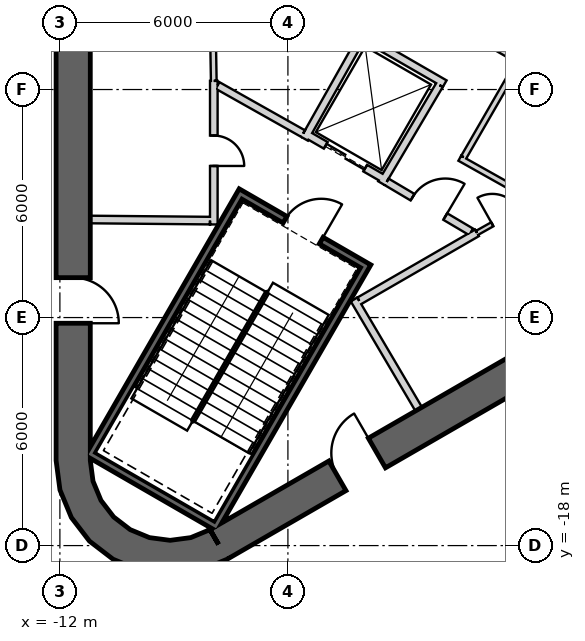
"""IFC4 building model, lengths in metres.
Left out: names, types, materials, properties, quantities, classifications, styles, units other than length and angle.
Written with IfcOpenShell. Run it as: python <this file> out.ifc"""

import sys

from ifc_helpers import new_model, si_unit, direction, frame, frame_2d, origin, place, context, subcontext, project, spatial, polyline, rectangle, outline, extrude, element, fill, save


model = new_model("IFC4")
c1 = context("Model", 3, precision=1e-05, world=origin(), true_north=direction((0.0, 1.0)))
c2 = subcontext(c1, "Body", "Model", "MODEL_VIEW")
j1 = project(units=[si_unit("LENGTHUNIT", "METRE"), si_unit("PLANEANGLEUNIT", "RADIAN")], contexts=[c1])
p1 = place(None, origin())
s1 = spatial("IfcSite", under=j1, at=p1, CompositionType="ELEMENT")
p2 = place(p1, origin())
s2 = spatial("IfcBuilding", under=s1, at=p2, CompositionType="ELEMENT")
p3 = place(p2, frame((0.0, 0.0, 410.3)))
s3 = spatial("IfcBuildingStorey", under=s2, at=p3, CompositionType="ELEMENT", Elevation=410.3)
p4 = place(p3, frame((-11.65, 15.762, 0.0), z_axis=(0.0, 0.0, 1.0), x_axis=(0.0, -1.0, 0.0)))
e1 = element("IfcWall", 1, at=p4, inside=s3, PredefinedType="SHEAR", context=c2, shape_type="SweptSolid", body=[
    extrude(rectangle(XDim=31.523, YDim=0.9, at=frame_2d((15.762, 0.0))), origin(), (0.0, 0.0, 1.0), 5.0),
])
p5 = place(p4, frame((3.612, 0.0, 0.0)))
e2 = element("IfcOpeningElement", 2, at=p5, cuts=e1, PredefinedType="OPENING", context=c2, shape_type="SweptSolid", body=[
    extrude(rectangle(XDim=1.2, YDim=2.4, at=frame_2d((0.6, 1.2))), frame((0.0, 0.46, 0.0), z_axis=(0.0, -1.0, 0.0), x_axis=(1.0, 0.0, 0.0)), (0.0, 0.0, 1.0), 0.92),
])
p6 = place(p4, frame((26.712, 0.0, 0.0)))
e3 = element("IfcOpeningElement", 3, at=p6, cuts=e1, PredefinedType="OPENING", context=c2, shape_type="SweptSolid", body=[
    extrude(rectangle(XDim=1.2, YDim=2.4, at=frame_2d((0.6, 1.2))), frame((0.0, 0.46, 0.0), z_axis=(0.0, -1.0, 0.0), x_axis=(1.0, 0.0, 0.0)), (0.0, 0.0, 1.0), 0.92),
])
p7 = place(p3, frame((-7.825, -17.97, 0.0), z_axis=(0.0, 0.0, 1.0), x_axis=(0.866028369851, 0.499994862586, 0.0)))
e4 = element("IfcWall", 4, at=p7, inside=s3, PredefinedType="SHEAR", context=c2, shape_type="SweptSolid", body=[
    extrude(rectangle(XDim=31.523, YDim=0.9, at=frame_2d((15.762, 0.0))), origin(), (0.0, 0.0, 1.0), 5.0),
])
p8 = place(p7, frame((17.862, 0.0, 0.0)))
e5 = element("IfcOpeningElement", 5, at=p8, cuts=e4, PredefinedType="OPENING", context=c2, shape_type="SweptSolid", body=[
    extrude(rectangle(XDim=1.2, YDim=2.4, at=frame_2d((0.6, 1.2))), frame((0.0, 0.46, 0.0), z_axis=(0.0, -1.0, 0.0), x_axis=(1.0, 0.0, 0.0)), (0.0, 0.0, 1.0), 0.92),
])
p9 = place(p7, frame((20.562, 0.0, 0.0)))
e6 = element("IfcOpeningElement", 6, at=p9, cuts=e4, PredefinedType="OPENING", context=c2, shape_type="SweptSolid", body=[
    extrude(rectangle(XDim=1.2, YDim=2.4, at=frame_2d((0.6, 1.2))), frame((0.0, 0.46, 0.0), z_axis=(0.0, -1.0, 0.0), x_axis=(1.0, 0.0, 0.0)), (0.0, 0.0, 1.0), 0.92),
])
p10 = place(p7, frame((26.712, 0.0, 0.0)))
e7 = element("IfcOpeningElement", 7, at=p10, cuts=e4, PredefinedType="OPENING", context=c2, shape_type="SweptSolid", body=[
    extrude(rectangle(XDim=1.2, YDim=2.4, at=frame_2d((0.6, 1.2))), frame((0.0, 0.46, 0.0), z_axis=(0.0, -1.0, 0.0), x_axis=(1.0, 0.0, 0.0)), (0.0, 0.0, 1.0), 0.92),
])
p11 = place(p7, frame((3.612, 0.0, 0.0)))
e8 = element("IfcOpeningElement", 8, at=p11, cuts=e4, PredefinedType="OPENING", context=c2, shape_type="SweptSolid", body=[
    extrude(rectangle(XDim=1.2, YDim=2.4, at=frame_2d((0.6, 1.2))), frame((0.0, 0.46, 0.0), z_axis=(0.0, -1.0, 0.0), x_axis=(1.0, 0.0, 0.0)), (0.0, 0.0, 1.0), 0.92),
])
p12 = place(p3, origin())
e9 = element("IfcWall", 9, at=p12, inside=s3, PredefinedType="SHEAR", context=c2, shape_type="SweptSolid", body=[
    extrude(outline(polyline([(-12.1, -15.762), (-11.998, -16.538), (-11.698, -17.262), (-11.221, -17.883), (-10.6, -18.36), (-9.876, -18.659), (-9.1, -18.762), (-8.323, -18.659), (-7.6, -18.36), (-8.05, -17.58), (-8.556, -17.79), (-9.1, -17.862), (-9.644, -17.79), (-10.15, -17.58), (-10.585, -17.247), (-10.919, -16.812), (-11.128, -16.305), (-11.2, -15.762), (-12.1, -15.762)])), origin(), (0.0, 0.0, 1.0), 5.0),
])
p13 = place(p3, frame((-1.186, -23.926, 0.0), z_axis=(0.0, 0.0, 1.0), x_axis=(0.824480875731, 0.565889817503, 0.0)))
e10 = element("IfcWall", 10, at=p13, inside=s3, PredefinedType="SOLIDWALL", context=c2, shape_type="SweptSolid", body=[
    extrude(rectangle(XDim=26.064, YDim=0.24, at=frame_2d((13.032, 0.0))), origin(), (0.0, 0.0, 1.0), 4.75),
])
p14 = place(p3, frame((21.34, -9.818, 0.04), z_axis=(0.0, 0.0, 1.0), x_axis=(-0.82447788812, -0.565894170319, 0.0)))
e11 = element("IfcWall", 11, at=p14, inside=s3, PredefinedType="PARAPET", context=c2, shape_type="SweptSolid", body=[
    extrude(rectangle(XDim=27.207, YDim=0.25, at=frame_2d((13.603, 0.0))), origin(), (0.0, 0.0, 1.0), 1.2),
])
p15 = place(p3, frame((20.588, -9.667, 0.04), z_axis=(0.0, 0.0, 1.0), x_axis=(-0.824474055668, -0.565899753958, 0.0)))
e12 = element("IfcWall", 12, at=p15, inside=s3, PredefinedType="PARAPET", context=c2, shape_type="SweptSolid", body=[
    extrude(rectangle(XDim=26.031, YDim=0.5, at=frame_2d((13.016, 0.0))), origin(), (0.0, 0.0, 1.0), 0.6),
])
p16 = place(p3, frame((-3.905, -10.563, -0.25), z_axis=(0.0, 0.0, 1.0), x_axis=(-0.500012932018, -0.866017937352, 0.0)))
e13 = element("IfcWall", 13, at=p16, inside=s3, PredefinedType="SHEAR", context=c2, shape_type="SweptSolid", body=[
    extrude(rectangle(XDim=8.1, YDim=0.2, at=frame_2d((4.05, 0.0))), origin(), (0.0, 0.0, 1.0), 5.0),
])
p17 = place(p3, frame((-11.282, -15.541, -0.25), z_axis=(0.0, 0.0, 1.0), x_axis=(0.866000483506, -0.500043160704, 0.0)))
e14 = element("IfcWall", 14, at=p17, inside=s3, PredefinedType="SHEAR", context=c2, shape_type="SweptSolid", body=[
    extrude(rectangle(XDim=3.8, YDim=0.2, at=frame_2d((1.9, 0.0))), origin(), (0.0, 0.0, 1.0), 5.0),
])
p18 = place(p3, frame((-7.196, -8.663, -0.25), z_axis=(0.0, 0.0, 1.0), x_axis=(-0.499997992926, -0.866026562566, 0.0)))
e15 = element("IfcWall", 15, at=p18, inside=s3, PredefinedType="SHEAR", context=c2, shape_type="SweptSolid", body=[
    extrude(rectangle(XDim=7.9, YDim=0.2, at=frame_2d((3.95, 0.0))), origin(), (0.0, 0.0, 1.0), 5.0),
])
p19 = place(p3, frame((-4.041, -10.599, -0.25), z_axis=(0.0, 0.0, 1.0), x_axis=(-0.866047807691, 0.499961193289, 0.0)))
e16 = element("IfcWall", 16, at=p19, inside=s3, PredefinedType="SHEAR", context=c2, shape_type="SweptSolid", body=[
    extrude(rectangle(XDim=3.6, YDim=0.2, at=frame_2d((1.8, 0.0))), origin(), (0.0, 0.0, 1.0), 5.0),
])
p20 = place(p19, frame((1.25, 0.0, 0.25)))
e17 = element("IfcOpeningElement", 17, at=p20, cuts=e16, PredefinedType="OPENING", context=c2, shape_type="SweptSolid", body=[
    extrude(rectangle(XDim=1.1, YDim=2.1, at=frame_2d((0.55, 1.05))), frame((0.0, 0.11, 0.0), z_axis=(0.0, -1.0, 0.0), x_axis=(1.0, 0.0, 0.0)), (0.0, 0.0, 1.0), 0.22),
])
p21 = place(p3, frame((-3.446, -8.368, 0.0), z_axis=(0.0, 0.0, 1.0), x_axis=(-0.866024647952, 0.500001309137, 0.0)))
e18 = element("IfcWall", 18, at=p21, inside=s3, PredefinedType="PLUMBINGWALL", context=c2, shape_type="SweptSolid", body=[
    extrude(rectangle(XDim=2.4, YDim=0.2, at=frame_2d((1.2, 0.0))), origin(), (0.0, 0.0, 1.0), 4.75),
])
p22 = place(p21, frame((0.6, 0.0, 0.0)))
e19 = element("IfcOpeningElement", 19, at=p22, cuts=e18, PredefinedType="OPENING", context=c2, shape_type="SweptSolid", body=[
    extrude(rectangle(XDim=1.2, YDim=2.4, at=frame_2d((0.6, 1.2))), frame((0.0, 0.11, 0.0), z_axis=(0.0, -1.0, 0.0), x_axis=(1.0, 0.0, 0.0)), (0.0, 0.0, 1.0), 0.22),
])
p23 = place(p3, frame((-5.562, -7.296, 0.0), z_axis=(0.0, 0.0, 1.0), x_axis=(0.491358283181, 0.870957540612, 0.0)))
e20 = element("IfcWall", 20, at=p23, inside=s3, PredefinedType="PLUMBINGWALL", context=c2, shape_type="SweptSolid", body=[
    extrude(rectangle(XDim=3.2, YDim=0.2, at=frame_2d((1.6, 0.0))), origin(), (0.0, 0.0, 1.0), 4.75),
])
p24 = place(p3, frame((-3.953, -4.646, 0.0), z_axis=(0.0, 0.0, 1.0), x_axis=(0.866024647952, -0.500001309137, 0.0)))
e21 = element("IfcWall", 21, at=p24, inside=s3, PredefinedType="PLUMBINGWALL", context=c2, shape_type="SweptSolid", body=[
    extrude(rectangle(XDim=2.4, YDim=0.2, at=frame_2d((1.2, 0.0))), origin(), (0.0, 0.0, 1.0), 4.75),
])
p25 = place(p3, frame((-2.012, -5.882, 0.0), z_axis=(0.0, 0.0, 1.0), x_axis=(-0.508619639323, -0.860991325447, 0.0)))
e22 = element("IfcWall", 22, at=p25, inside=s3, PredefinedType="PLUMBINGWALL", context=c2, shape_type="SweptSolid", body=[
    extrude(rectangle(XDim=3.0, YDim=0.2, at=frame_2d((1.5, 0.0))), origin(), (0.0, 0.0, 1.0), 4.75),
])
p26 = place(p3, frame((-7.95, -9.55, 0.0), z_axis=(0.0, 0.0, 1.0), x_axis=(0.0, 1.0, 0.0)))
e23 = element("IfcWall", 23, at=p26, inside=s3, PredefinedType="PARTITIONING", context=c2, shape_type="SweptSolid", body=[
    extrude(rectangle(XDim=3.778, YDim=0.2, at=frame_2d((1.889, 0.0))), origin(), (0.0, 0.0, 1.0), 4.75),
])
p27 = place(p26, frame((1.539, 0.0, 0.0)))
e24 = element("IfcOpeningElement", 24, at=p27, cuts=e23, PredefinedType="OPENING", context=c2, shape_type="SweptSolid", body=[
    extrude(rectangle(XDim=0.8, YDim=2.1, at=frame_2d((0.4, 1.05))), frame((0.0, 0.11, 0.0), z_axis=(0.0, -1.0, 0.0), x_axis=(1.0, 0.0, 0.0)), (0.0, 0.0, 1.0), 0.22),
])
p28 = place(p3, frame((-11.2, -9.42, 0.0), z_axis=(0.0, 0.0, 1.0), x_axis=(0.999957467379, -0.009222983926, 0.0)))
e25 = element("IfcWall", 25, at=p28, inside=s3, PredefinedType="PARTITIONING", context=c2, shape_type="SweptSolid", body=[
    extrude(rectangle(XDim=3.15, YDim=0.2, at=frame_2d((1.575, 0.0))), origin(), (0.0, 0.0, 1.0), 4.75),
])
p29 = place(p3, frame((-7.98, -4.05, 0.0), z_axis=(0.0, 0.0, 1.0), x_axis=(0.016723387416, -0.999860154378, 0.0)))
e26 = element("IfcWall", 26, at=p29, inside=s3, PredefinedType="PLUMBINGWALL", context=c2, shape_type="SweptSolid", body=[
    extrude(rectangle(XDim=1.723, YDim=0.15, at=frame_2d((0.861, 0.0))), origin(), (0.0, 0.0, 1.0), 4.75),
])
p30 = place(p3, frame((-4.26, -11.524, 0.0), z_axis=(0.0, 0.0, 1.0), x_axis=(0.507997497166, -0.861358544901, 0.0)))
e27 = element("IfcWall", 27, at=p30, inside=s3, PredefinedType="PARTITIONING", context=c2, shape_type="SweptSolid", body=[
    extrude(rectangle(XDim=3.35, YDim=0.2, at=frame_2d((1.675, 0.0))), origin(), (0.0, 0.0, 1.0), 4.75),
])
p31 = place(p3, frame((-1.024, -9.771, 0.0), z_axis=(0.0, 0.0, 1.0), x_axis=(-0.866029903013, -0.499992207027, 0.0)))
e28 = element("IfcWall", 28, at=p31, inside=s3, PredefinedType="PARTITIONING", context=c2, shape_type="SweptSolid", body=[
    extrude(rectangle(XDim=3.578, YDim=0.2, at=frame_2d((1.789, 0.0))), origin(), (0.0, 0.0, 1.0), 4.75),
])
p32 = place(p3, frame((0.478, -8.928, 0.0), z_axis=(0.0, 0.0, 1.0), x_axis=(-0.871968924608, -0.489561226527, 0.0)))
e29 = element("IfcWall", 29, at=p32, inside=s3, PredefinedType="PARTITIONING", context=c2, shape_type="SweptSolid", body=[
    extrude(rectangle(XDim=1.722, YDim=0.12, at=frame_2d((0.861, 0.0))), origin(), (0.0, 0.0, 1.0), 4.75),
])
p33 = place(p32, frame((0.461, 0.0, 0.0)))
e30 = element("IfcOpeningElement", 30, at=p33, cuts=e29, PredefinedType="OPENING", context=c2, shape_type="SweptSolid", body=[
    extrude(rectangle(XDim=0.8, YDim=2.1, at=frame_2d((0.4, 1.05))), frame((0.0, 0.07, 0.0), z_axis=(0.0, -1.0, 0.0), x_axis=(1.0, 0.0, 0.0)), (0.0, 0.0, 1.0), 0.14),
])
p34 = place(p3, frame((-7.85, -5.893, 0.0), z_axis=(0.0, 0.0, 1.0), x_axis=(0.871350695252, -0.490660744185, 0.0)))
e31 = element("IfcWall", 31, at=p34, inside=s3, PredefinedType="PARTITIONING", context=c2, shape_type="SweptSolid", body=[
    extrude(rectangle(XDim=2.582, YDim=0.2, at=frame_2d((1.291, 0.0))), origin(), (0.0, 0.0, 1.0), 4.75),
])
p35 = place(p3, frame((-3.401, -8.43, 0.0), z_axis=(0.0, 0.0, 1.0), x_axis=(0.860630814782, -0.509229418482, 0.0)))
e32 = element("IfcWall", 32, at=p35, inside=s3, PredefinedType="PARTITIONING", context=c2, shape_type="SweptSolid", body=[
    extrude(rectangle(XDim=2.582, YDim=0.2, at=frame_2d((1.291, 0.0))), origin(), (0.0, 0.0, 1.0), 4.75),
])
p36 = place(p35, frame((0.791, 0.0, 0.0)))
e33 = element("IfcOpeningElement", 33, at=p36, cuts=e32, PredefinedType="OPENING", context=c2, shape_type="SweptSolid", body=[
    extrude(rectangle(XDim=1.0, YDim=2.1, at=frame_2d((0.5, 1.05))), frame((0.0, 0.11, 0.0), z_axis=(0.0, -1.0, 0.0), x_axis=(1.0, 0.0, 0.0)), (0.0, 0.0, 1.0), 0.22),
])
p37 = place(p3, frame((-1.477, -7.808, 0.0), z_axis=(0.0, 0.0, 1.0), x_axis=(0.871822901869, -0.48982122022, 0.0)))
e34 = element("IfcWall", 34, at=p37, inside=s3, PredefinedType="PLUMBINGWALL", context=c2, shape_type="SweptSolid", body=[
    extrude(rectangle(XDim=2.24, YDim=0.15, at=frame_2d((1.12, 0.0))), origin(), (0.0, 0.0, 1.0), 4.75),
])
p38 = place(p3, frame((0.126, -5.182, 0.0), z_axis=(0.0, 0.0, 1.0), x_axis=(-0.499990139034, -0.866031096941, 0.0)))
e35 = element("IfcWall", 35, at=p38, inside=s3, PredefinedType="PLUMBINGWALL", context=c2, shape_type="SweptSolid", body=[
    extrude(rectangle(XDim=3.0, YDim=0.15, at=frame_2d((1.5, 0.0))), origin(), (0.0, 0.0, 1.0), 4.75),
])
p39 = place(p3, frame((-1.449, -4.36, 0.0), z_axis=(0.0, 0.0, 1.0), x_axis=(0.866025371046, -0.500000056704, 0.0)))
e36 = element("IfcWall", 36, at=p39, inside=s3, PredefinedType="PLUMBINGWALL", context=c2, shape_type="SweptSolid", body=[
    extrude(rectangle(XDim=1.7, YDim=0.15, at=frame_2d((0.85, 0.0))), origin(), (0.0, 0.0, 1.0), 4.75),
])
p40 = place(p20, origin())
e37 = element("IfcDoor", 37, at=p40, inside=s3, OperationType="SINGLE_SWING_LEFT", PredefinedType="USERDEFINED", context=c2, shape_type="SweptSolid", body=[
    extrude(rectangle(XDim=1.1, YDim=2.1, at=frame_2d((0.55, 1.05))), frame((0.0, 0.025, 0.0), z_axis=(0.0, -1.0, 0.0), x_axis=(1.0, 0.0, 0.0)), (0.0, 0.0, 1.0), 0.05),
])
fill(e17, e37)
p41 = place(p36, origin())
e38 = element("IfcDoor", 38, at=p41, inside=s3, OperationType="SINGLE_SWING_RIGHT", PredefinedType="USERDEFINED", context=c2, shape_type="SweptSolid", body=[
    extrude(rectangle(XDim=1.0, YDim=2.1, at=frame_2d((0.5, 1.05))), frame((0.0, 0.025, 0.0), z_axis=(0.0, -1.0, 0.0), x_axis=(1.0, 0.0, 0.0)), (0.0, 0.0, 1.0), 0.05),
])
fill(e33, e38)
p42 = place(p22, origin())
e39 = element("IfcDoor", 39, at=p42, inside=s3, OperationType="SLIDING_TO_LEFT", PredefinedType="USERDEFINED", context=c2, shape_type="SweptSolid", body=[
    extrude(rectangle(XDim=1.2, YDim=2.4, at=frame_2d((0.6, 1.2))), frame((0.0, 0.025, 0.0), z_axis=(0.0, -1.0, 0.0), x_axis=(1.0, 0.0, 0.0)), (0.0, 0.0, 1.0), 0.05),
])
fill(e19, e39)
p43 = place(p27, origin())
e40 = element("IfcDoor", 40, at=p43, inside=s3, OperationType="SINGLE_SWING_LEFT", PredefinedType="USERDEFINED", context=c2, shape_type="SweptSolid", body=[
    extrude(rectangle(XDim=0.8, YDim=2.1, at=frame_2d((0.4, 1.05))), frame((0.0, 0.025, 0.0), z_axis=(0.0, -1.0, 0.0), x_axis=(1.0, 0.0, 0.0)), (0.0, 0.0, 1.0), 0.05),
])
fill(e24, e40)
p44 = place(p33, origin())
e41 = element("IfcDoor", 41, at=p44, inside=s3, OperationType="SINGLE_SWING_RIGHT", PredefinedType="USERDEFINED", context=c2, shape_type="SweptSolid", body=[
    extrude(rectangle(XDim=0.8, YDim=2.1, at=frame_2d((0.4, 1.05))), frame((0.0, 0.025, 0.0), z_axis=(0.0, -1.0, 0.0), x_axis=(1.0, 0.0, 0.0)), (0.0, 0.0, 1.0), 0.05),
])
fill(e30, e41)
p45 = place(p6, origin())
e42 = element("IfcDoor", 42, at=p45, inside=s3, OperationType="SINGLE_SWING_RIGHT", PredefinedType="USERDEFINED", context=c2, shape_type="SweptSolid", body=[
    extrude(rectangle(XDim=1.2, YDim=2.4, at=frame_2d((0.6, 1.2))), frame((0.0, 0.025, 0.0), z_axis=(0.0, -1.0, 0.0), x_axis=(1.0, 0.0, 0.0)), (0.0, 0.0, 1.0), 0.05),
])
fill(e3, e42)
p46 = place(p11, origin())
e43 = element("IfcDoor", 43, at=p46, inside=s3, OperationType="SINGLE_SWING_RIGHT", PredefinedType="USERDEFINED", context=c2, shape_type="SweptSolid", body=[
    extrude(rectangle(XDim=1.2, YDim=2.4, at=frame_2d((0.6, 1.2))), frame((0.0, 0.025, 0.0), z_axis=(0.0, -1.0, 0.0), x_axis=(1.0, 0.0, 0.0)), (0.0, 0.0, 1.0), 0.05),
])
fill(e8, e43)
save(model, sys.argv[1])
